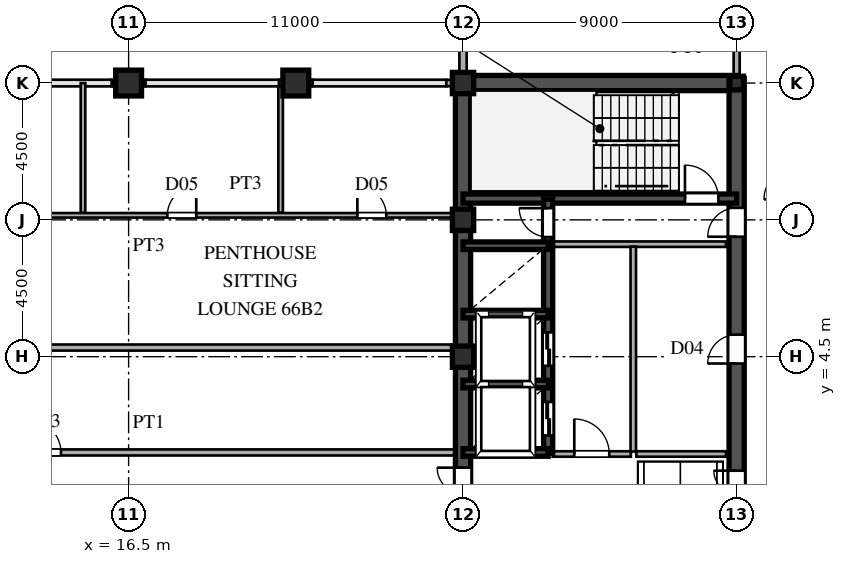
"""IFC4 building model, lengths in metres.
Left out: names, types, materials, properties, quantities, classifications, styles, units other than length and angle.
Written with IfcOpenShell. Run it as: python <this file> out.ifc"""

import sys

from ifc_helpers import new_model, si_unit, direction, frame, frame_2d, origin, origin_2d, place, context, subcontext, project, spatial, rectangle, hollow_rectangle, i_section, extrude, source, transform, mapped, element, fill, save


model = new_model("IFC4")
c1 = context("Model", 3, precision=1e-05, world=origin(), true_north=direction((0.0, 1.0)))
c2 = subcontext(c1, "Body", "Model", "MODEL_VIEW")
j1 = project(units=[si_unit("LENGTHUNIT", "METRE"), si_unit("PLANEANGLEUNIT", "RADIAN")], contexts=[c1])
p1 = place(None, origin())
s1 = spatial("IfcSite", under=j1, at=p1, CompositionType="ELEMENT")
p2 = place(p1, origin())
s2 = spatial("IfcBuilding", under=s1, at=p2, CompositionType="ELEMENT")
p3 = place(p2, frame((0.0, 0.0, 250.65)))
s3 = spatial("IfcBuildingStorey", under=s2, at=p3, CompositionType="ELEMENT", Elevation=250.65)
m1 = source(origin(), c2, "Body", "SweptSolid", [
    extrude(hollow_rectangle(XDim=0.7, YDim=0.7, WallThickness=0.03, at=origin_2d()), origin(), (0.0, 0.0, 1.0), 3.75),
])
for number, where, z_axis, x_axis in (
    (1, (27.5, 4.5, 0.0), (0.0, 0.0, 1.0), (1.0, 0.0, 0.0)),
    (2, (27.5, 9.0, 0.0), (0.0, 0.0, 1.0), (1.0, 0.0, 0.0)),
    (3, (27.5, 13.5, 0.0), (0.0, 0.0, 1.0), (1.0, 0.0, 0.0)),
):
    element("IfcColumn", number, at=place(p3, frame(where, z_axis=z_axis, x_axis=x_axis)), inside=s3, PredefinedType="COLUMN", context=c2, shape_type="MappedRepresentation", body=[
        mapped(m1, transform((0.0, 0.0, 0.0), scale=1.0)),
    ])
m2 = source(origin(), c2, "Body", "SweptSolid", [
    extrude(i_section(OverallWidth=0.45, OverallDepth=0.45, WebThickness=0.016, FlangeThickness=0.025, at=origin_2d()), origin(), (0.0, 0.0, 1.0), 3.75),
])
p4 = place(p3, frame((36.5, 13.5, 0.0), z_axis=(0.0, 0.0, 1.0), x_axis=(1.0, 0.0, 0.0)))
e4 = element("IfcColumn", 4, at=p4, inside=s3, PredefinedType="COLUMN", context=c2, shape_type="MappedRepresentation", body=[
    mapped(m2, transform((0.0, 0.0, 0.0), scale=1.0)),
])
m3 = source(origin(), c2, "Body", "SweptSolid", [
    extrude(hollow_rectangle(XDim=0.85, YDim=0.85, WallThickness=0.036, at=origin_2d()), origin(), (0.0, 0.0, 1.0), 3.75),
])
for number, where, z_axis, x_axis in (
    (5, (16.5, 13.5, 0.0), (0.0, 0.0, 1.0), (1.0, 0.0, 0.0)),
    (6, (22.0, 13.5, 0.0), (0.0, 0.0, 1.0), (1.0, 0.0, 0.0)),
):
    element("IfcColumn", number, at=place(p3, frame(where, z_axis=z_axis, x_axis=x_axis)), inside=s3, PredefinedType="COLUMN", context=c2, shape_type="MappedRepresentation", body=[
        mapped(m3, transform((0.0, 0.0, 0.0), scale=1.0)),
    ])
p5 = place(p3, frame((27.5, 13.755, 0.0), z_axis=(0.0, 0.0, 1.0), x_axis=(0.0, 1.0, 0.0)))
e7 = element("IfcWall", 7, at=p5, inside=s3, PredefinedType="SOLIDWALL", context=c2, shape_type="SweptSolid", body=[
    extrude(rectangle(XDim=0.62, YDim=0.24, at=frame_2d((0.31, 0.0))), origin(), (0.0, 0.0, 1.0), 3.03),
])
p6 = place(p3, frame((27.5, 14.375, 0.0), z_axis=(0.0, 0.0, 1.0), x_axis=(0.0, 1.0, 0.0)))
e8 = element("IfcWall", 8, at=p6, inside=s3, PredefinedType="SOLIDWALL", context=c2, shape_type="SweptSolid", body=[
    extrude(rectangle(XDim=1.605, YDim=0.24, at=frame_2d((0.803, 0.0))), origin(), (0.0, 0.0, 1.0), 3.53),
])
for number, where, z_axis, x_axis in (
    (9, (15.95, 13.5, 0.0), (0.0, 0.0, 1.0), (1.0, 0.0, 0.0)),
    (10, (21.45, 13.5, 0.0), (0.0, 0.0, 1.0), (1.0, 0.0, 0.0)),
):
    element("IfcWall", number, at=place(p3, frame(where, z_axis=z_axis, x_axis=x_axis)), inside=s3, PredefinedType="SOLIDWALL", context=c2, shape_type="SweptSolid", body=[
        extrude(rectangle(XDim=1.1, YDim=0.21, at=frame_2d((0.55, 0.0))), origin(), (0.0, 0.0, 1.0), 3.03),
    ])
p7 = place(p3, frame((26.95, 13.5, 0.0), z_axis=(0.0, 0.0, 1.0), x_axis=(1.0, 0.0, 0.0)))
e11 = element("IfcWall", 11, at=p7, inside=s3, PredefinedType="SOLIDWALL", context=c2, shape_type="SweptSolid", body=[
    extrude(rectangle(XDim=0.54, YDim=0.21, at=frame_2d((0.27, 0.0))), origin(), (0.0, 0.0, 1.0), 3.03),
])
p8 = place(p3, frame((27.5, 1.3, 0.0), z_axis=(0.0, 0.0, 1.0), x_axis=(0.0, 1.0, 0.0)))
e12 = element("IfcWall", 12, at=p8, inside=s3, PredefinedType="SHEAR", context=c2, shape_type="SweptSolid", body=[
    extrude(rectangle(XDim=12.2, YDim=0.5, at=frame_2d((6.1, 0.0))), origin(), (0.0, 0.0, 1.0), 3.53),
])
p9 = place(p3, frame((27.5, -1.3, 0.0), z_axis=(0.0, 0.0, 1.0), x_axis=(0.0, 1.0, 0.0)))
e13 = element("IfcWall", 13, at=p9, inside=s3, PredefinedType="SHEAR", context=c2, shape_type="SweptSolid", body=[
    extrude(rectangle(XDim=2.6, YDim=0.5, at=frame_2d((1.3, 0.0))), origin(), (0.0, 0.0, 1.0), 3.53),
])
p10 = place(p9, frame((0.45, 0.0, 0.0)))
e14 = element("IfcOpeningElement", 14, at=p10, cuts=e13, PredefinedType="OPENING", context=c2, shape_type="SweptSolid", body=[
    extrude(rectangle(XDim=1.7, YDim=2.35, at=frame_2d((0.85, 1.175))), frame((0.0, 0.26, 0.0), z_axis=(0.0, -1.0, 0.0), x_axis=(1.0, 0.0, 0.0)), (0.0, 0.0, 1.0), 0.52),
])
p11 = place(p3, frame((27.5, 13.5, 0.0), z_axis=(0.0, 0.0, 1.0), x_axis=(1.0, 0.0, 0.0)))
e15 = element("IfcWall", 15, at=p11, inside=s3, PredefinedType="SHEAR", context=c2, shape_type="SweptSolid", body=[
    extrude(rectangle(XDim=9.0, YDim=0.5, at=frame_2d((4.5, 0.0))), origin(), (0.0, 0.0, 1.0), 3.53),
])
p12 = place(p3, frame((36.5, -1.3, 0.0), z_axis=(0.0, 0.0, 1.0), x_axis=(0.0, 1.0, 0.0)))
e16 = element("IfcWall", 16, at=p12, inside=s3, PredefinedType="SHEAR", context=c2, shape_type="SweptSolid", body=[
    extrude(rectangle(XDim=2.6, YDim=0.5, at=frame_2d((1.3, 0.0))), origin(), (0.0, 0.0, 1.0), 3.53),
])
p13 = place(p12, frame((0.55, 0.0, 0.0)))
e17 = element("IfcOpeningElement", 17, at=p13, cuts=e16, PredefinedType="OPENING", context=c2, shape_type="SweptSolid", body=[
    extrude(rectangle(XDim=1.5, YDim=2.3, at=frame_2d((0.75, 1.15))), frame((0.0, 0.26, 0.0), z_axis=(0.0, -1.0, 0.0), x_axis=(1.0, 0.0, 0.0)), (0.0, 0.0, 1.0), 0.52),
])
p14 = place(p3, frame((36.5, 8.2, 0.0), z_axis=(0.0, 0.0, 1.0), x_axis=(0.0, 1.0, 0.0)))
e18 = element("IfcWall", 18, at=p14, inside=s3, PredefinedType="SHEAR", context=c2, shape_type="SweptSolid", body=[
    extrude(rectangle(XDim=5.45, YDim=0.5, at=frame_2d((2.725, 0.0))), origin(), (0.0, 0.0, 1.0), 3.53),
])
p15 = place(p14, frame((0.245, 0.0, 0.0)))
e19 = element("IfcOpeningElement", 19, at=p15, cuts=e18, PredefinedType="OPENING", context=c2, shape_type="SweptSolid", body=[
    extrude(rectangle(XDim=0.95, YDim=2.15, at=frame_2d((0.475, 1.075))), frame((0.0, 0.26, 0.0), z_axis=(0.0, -1.0, 0.0), x_axis=(1.0, 0.0, 0.0)), (0.0, 0.0, 1.0), 0.52),
])
p16 = place(p3, frame((36.5, 1.3, 0.0), z_axis=(0.0, 0.0, 1.0), x_axis=(0.0, 1.0, 0.0)))
e20 = element("IfcWall", 20, at=p16, inside=s3, PredefinedType="SHEAR", context=c2, shape_type="SweptSolid", body=[
    extrude(rectangle(XDim=6.9, YDim=0.5, at=frame_2d((3.45, 0.0))), origin(), (0.0, 0.0, 1.0), 3.53),
])
p17 = place(p16, frame((2.975, 0.0, 0.0)))
e21 = element("IfcOpeningElement", 21, at=p17, cuts=e20, PredefinedType="OPENING", context=c2, shape_type="SweptSolid", body=[
    extrude(rectangle(XDim=0.95, YDim=2.15, at=frame_2d((0.475, 1.075))), frame((0.0, 0.26, 0.0), z_axis=(0.0, -1.0, 0.0), x_axis=(1.0, 0.0, 0.0)), (0.0, 0.0, 1.0), 0.52),
])
p18 = place(p3, frame((27.5, 9.7, 0.0), z_axis=(0.0, 0.0, 1.0), x_axis=(1.0, 0.0, 0.0)))
e22 = element("IfcWall", 22, at=p18, inside=s3, PredefinedType="SHEAR", context=c2, shape_type="SweptSolid", body=[
    extrude(rectangle(XDim=9.0, YDim=0.3, at=frame_2d((4.5, 0.0))), origin(), (0.0, 0.0, 1.0), 3.53),
])
p19 = place(p18, frame((7.3, 0.0, 0.0)))
e23 = element("IfcOpeningElement", 23, at=p19, cuts=e22, PredefinedType="OPENING", context=c2, shape_type="SweptSolid", body=[
    extrude(rectangle(XDim=1.1, YDim=2.2, at=frame_2d((0.55, 1.1))), frame((0.0, 0.16, 0.0), z_axis=(0.0, -1.0, 0.0), x_axis=(1.0, 0.0, 0.0)), (0.0, 0.0, 1.0), 0.32),
])
for number, where, z_axis, x_axis in (
    (24, (27.5, 1.35, 0.0), (0.0, 0.0, 1.0), (1.0, 0.0, 0.0)),
    (25, (27.5, 3.6, 0.0), (0.0, 0.0, 1.0), (1.0, 0.0, 0.0)),
    (26, (27.5, 5.9, 0.0), (0.0, 0.0, 1.0), (1.0, 0.0, 0.0)),
    (27, (27.5, 8.15, 0.0), (0.0, 0.0, 1.0), (1.0, 0.0, 0.0)),
):
    element("IfcWall", number, at=place(p3, frame(where, z_axis=z_axis, x_axis=x_axis)), inside=s3, PredefinedType="SHEAR", context=c2, shape_type="SweptSolid", body=[
        extrude(rectangle(XDim=2.8, YDim=0.25, at=frame_2d((1.4, 0.0))), origin(), (0.0, 0.0, 1.0), 3.53),
    ])
p20 = place(p3, frame((30.3, 1.32, 0.0), z_axis=(0.0, 0.0, 1.0), x_axis=(0.0, 1.0, 0.0)))
e28 = element("IfcWall", 28, at=p20, inside=s3, PredefinedType="SHEAR", context=c2, shape_type="SweptSolid", body=[
    extrude(rectangle(XDim=2.28, YDim=0.3, at=frame_2d((1.14, 0.0))), origin(), (0.0, 0.0, 1.0), 3.53),
])
p21 = place(p20, frame((0.59, 0.0, 0.0)))
e29 = element("IfcOpeningElement", 29, at=p21, cuts=e28, PredefinedType="OPENING", context=c2, shape_type="SweptSolid", body=[
    extrude(rectangle(XDim=1.1, YDim=2.2, at=frame_2d((0.55, 1.1))), frame((0.0, 0.16, 0.0), z_axis=(0.0, -1.0, 0.0), x_axis=(1.0, 0.0, 0.0)), (0.0, 0.0, 1.0), 0.32),
])
p22 = place(p3, frame((30.3, 3.6, 0.0), z_axis=(0.0, 0.0, 1.0), x_axis=(0.0, 1.0, 0.0)))
e30 = element("IfcWall", 30, at=p22, inside=s3, PredefinedType="SHEAR", context=c2, shape_type="SweptSolid", body=[
    extrude(rectangle(XDim=2.3, YDim=0.3, at=frame_2d((1.15, 0.0))), origin(), (0.0, 0.0, 1.0), 3.53),
])
p23 = place(p22, frame((0.6, 0.0, 0.0)))
e31 = element("IfcOpeningElement", 31, at=p23, cuts=e30, PredefinedType="OPENING", context=c2, shape_type="SweptSolid", body=[
    extrude(rectangle(XDim=1.1, YDim=2.2, at=frame_2d((0.55, 1.1))), frame((0.0, 0.16, 0.0), z_axis=(0.0, -1.0, 0.0), x_axis=(1.0, 0.0, 0.0)), (0.0, 0.0, 1.0), 0.32),
])
p24 = place(p3, frame((30.3, 5.9, 0.0), z_axis=(0.0, 0.0, 1.0), x_axis=(0.0, 1.0, 0.0)))
e32 = element("IfcWall", 32, at=p24, inside=s3, PredefinedType="SHEAR", context=c2, shape_type="SweptSolid", body=[
    extrude(rectangle(XDim=2.25, YDim=0.3, at=frame_2d((1.125, 0.0))), origin(), (0.0, 0.0, 1.0), 3.53),
])
p25 = place(p3, frame((30.3, 8.15, 0.0), z_axis=(0.0, 0.0, 1.0), x_axis=(0.0, 1.0, 0.0)))
e33 = element("IfcWall", 33, at=p25, inside=s3, PredefinedType="SHEAR", context=c2, shape_type="SweptSolid", body=[
    extrude(rectangle(XDim=1.53, YDim=0.3, at=frame_2d((0.765, 0.0))), origin(), (0.0, 0.0, 1.0), 3.53),
])
p26 = place(p25, frame((0.285, 0.0, 0.0)))
e34 = element("IfcOpeningElement", 34, at=p26, cuts=e33, PredefinedType="OPENING", context=c2, shape_type="SweptSolid", body=[
    extrude(rectangle(XDim=0.95, YDim=2.15, at=frame_2d((0.475, 1.075))), frame((0.0, 0.16, 0.0), z_axis=(0.0, -1.0, 0.0), x_axis=(1.0, 0.0, 0.0)), (0.0, 0.0, 1.0), 0.32),
])
p27 = place(p3, frame((30.45, 8.2, 0.0), z_axis=(0.0, 0.0, 1.0), x_axis=(1.0, 0.0, 0.0)))
e35 = element("IfcWall", 35, at=p27, inside=s3, PredefinedType="PARTITIONING", context=c2, shape_type="SweptSolid", body=[
    extrude(rectangle(XDim=5.7, YDim=0.18, at=frame_2d((2.85, 0.0))), origin(), (0.0, 0.0, 1.0), 3.53),
])
p28 = place(p3, frame((33.1, 1.38, 0.0), z_axis=(0.0, 0.0, 1.0), x_axis=(0.0, 1.0, 0.0)))
e36 = element("IfcWall", 36, at=p28, inside=s3, PredefinedType="PARTITIONING", context=c2, shape_type="SweptSolid", body=[
    extrude(rectangle(XDim=6.74, YDim=0.18, at=frame_2d((3.37, 0.0))), origin(), (0.0, 0.0, 1.0), 3.53),
])
p29 = place(p3, frame((30.45, 1.3, 0.0), z_axis=(0.0, 0.0, 1.0), x_axis=(1.0, 0.0, 0.0)))
e37 = element("IfcWall", 37, at=p29, inside=s3, PredefinedType="PARTITIONING", context=c2, shape_type="SweptSolid", body=[
    extrude(rectangle(XDim=2.57, YDim=0.18, at=frame_2d((1.285, 0.0))), origin(), (0.0, 0.0, 1.0), 3.53),
])
p30 = place(p29, frame((0.71, 0.0, 0.0)))
e38 = element("IfcOpeningElement", 38, at=p30, cuts=e37, PredefinedType="OPENING", context=c2, shape_type="SweptSolid", body=[
    extrude(rectangle(XDim=1.15, YDim=2.2, at=frame_2d((0.575, 1.1))), frame((0.0, 0.1, 0.0), z_axis=(0.0, -1.0, 0.0), x_axis=(1.0, 0.0, 0.0)), (0.0, 0.0, 1.0), 0.2),
])
p31 = place(p3, frame((33.2, 1.3, 0.0), z_axis=(0.0, 0.0, 1.0), x_axis=(1.0, 0.0, 0.0)))
e39 = element("IfcWall", 39, at=p31, inside=s3, PredefinedType="PARTITIONING", context=c2, shape_type="SweptSolid", body=[
    extrude(rectangle(XDim=2.95, YDim=0.18, at=frame_2d((1.475, 0.0))), origin(), (0.0, 0.0, 1.0), 3.53),
])
p32 = place(p3, frame((7.085, 1.35, 0.0), z_axis=(0.0, 0.0, 1.0), x_axis=(1.0, 0.0, 0.0)))
e40 = element("IfcWall", 40, at=p32, inside=s3, PredefinedType="PARTITIONING", context=c2, shape_type="SweptSolid", body=[
    extrude(rectangle(XDim=20.16, YDim=0.2, at=frame_2d((10.08, 0.0))), origin(), (0.0, 0.0, 1.0), 3.53),
])
p33 = place(p32, frame((6.14, 0.0, 0.0)))
e41 = element("IfcOpeningElement", 41, at=p33, cuts=e40, PredefinedType="OPENING", context=c2, shape_type="SweptSolid", body=[
    extrude(rectangle(XDim=1.05, YDim=2.25, at=frame_2d((0.525, 1.125))), frame((0.0, 0.11, 0.0), z_axis=(0.0, -1.0, 0.0), x_axis=(1.0, 0.0, 0.0)), (0.0, 0.0, 1.0), 0.22),
])
p34 = place(p3, frame((-27.245, 4.8, 0.0), z_axis=(0.0, 0.0, 1.0), x_axis=(1.0, 0.0, 0.0)))
e42 = element("IfcWall", 42, at=p34, inside=s3, PredefinedType="PARTITIONING", context=c2, shape_type="SweptSolid", body=[
    extrude(rectangle(XDim=54.49, YDim=0.2, at=frame_2d((27.245, 0.0))), origin(), (0.0, 0.0, 1.0), 3.53),
])
p35 = place(p34, frame((24.97, 0.0, 0.0)))
e43 = element("IfcOpeningElement", 43, at=p35, cuts=e42, PredefinedType="OPENING", context=c2, shape_type="SweptSolid", body=[
    extrude(rectangle(XDim=1.05, YDim=2.25, at=frame_2d((0.525, 1.125))), frame((0.0, 0.11, 0.0), z_axis=(0.0, -1.0, 0.0), x_axis=(1.0, 0.0, 0.0)), (0.0, 0.0, 1.0), 0.22),
])
p36 = place(p3, frame((7.085, 9.15, 0.0), z_axis=(0.0, 0.0, 1.0), x_axis=(1.0, 0.0, 0.0)))
e44 = element("IfcWall", 44, at=p36, inside=s3, PredefinedType="PARTITIONING", context=c2, shape_type="SweptSolid", body=[
    extrude(rectangle(XDim=20.16, YDim=0.15, at=frame_2d((10.08, 0.0))), origin(), (0.0, 0.0, 1.0), 3.53),
])
p37 = place(p36, frame((3.44, 0.0, 0.0)))
e45 = element("IfcOpeningElement", 45, at=p37, cuts=e44, PredefinedType="OPENING", context=c2, shape_type="SweptSolid", body=[
    extrude(rectangle(XDim=0.95, YDim=2.15, at=frame_2d((0.475, 1.075))), frame((0.0, 0.085, 0.0), z_axis=(0.0, -1.0, 0.0), x_axis=(1.0, 0.0, 0.0)), (0.0, 0.0, 1.0), 0.17),
])
p38 = place(p36, frame((10.69, 0.0, 0.0)))
e46 = element("IfcOpeningElement", 46, at=p38, cuts=e44, PredefinedType="OPENING", context=c2, shape_type="SweptSolid", body=[
    extrude(rectangle(XDim=0.95, YDim=2.15, at=frame_2d((0.475, 1.075))), frame((0.0, 0.085, 0.0), z_axis=(0.0, -1.0, 0.0), x_axis=(1.0, 0.0, 0.0)), (0.0, 0.0, 1.0), 0.17),
])
p39 = place(p36, frame((16.94, 0.0, 0.0)))
e47 = element("IfcOpeningElement", 47, at=p39, cuts=e44, PredefinedType="OPENING", context=c2, shape_type="SweptSolid", body=[
    extrude(rectangle(XDim=0.95, YDim=2.15, at=frame_2d((0.475, 1.075))), frame((0.0, 0.085, 0.0), z_axis=(0.0, -1.0, 0.0), x_axis=(1.0, 0.0, 0.0)), (0.0, 0.0, 1.0), 0.17),
])
p40 = place(p3, frame((15.0, 9.235, 0.0), z_axis=(0.0, 0.0, 1.0), x_axis=(0.0, 1.0, 0.0)))
e48 = element("IfcWall", 48, at=p40, inside=s3, PredefinedType="PARTITIONING", context=c2, shape_type="SweptSolid", body=[
    extrude(rectangle(XDim=4.265, YDim=0.15, at=frame_2d((2.132, 0.0))), origin(), (0.0, 0.0, 1.0), 3.53),
])
p41 = place(p3, frame((21.5, 9.235, 0.0), z_axis=(0.0, 0.0, 1.0), x_axis=(0.0, 1.0, 0.0)))
e49 = element("IfcWall", 49, at=p41, inside=s3, PredefinedType="PARTITIONING", context=c2, shape_type="SweptSolid", body=[
    extrude(rectangle(XDim=4.155, YDim=0.15, at=frame_2d((2.077, 0.0))), origin(), (0.0, 0.0, 1.0), 3.53),
])
p42 = place(p3, frame((36.5, 13.755, 0.0), z_axis=(0.0, 0.0, 1.0), x_axis=(0.0, 1.0, 0.0)))
e50 = element("IfcWall", 50, at=p42, inside=s3, PredefinedType="PARTITIONING", context=c2, shape_type="SweptSolid", body=[
    extrude(rectangle(XDim=1.76, YDim=0.2, at=frame_2d((0.88, 0.0))), origin(), (0.0, 0.0, 1.0), 2.93),
])
m4 = source(origin(), c2, "Body", "SweptSolid", [
    extrude(rectangle(XDim=1.7, YDim=2.35, at=frame_2d((0.85, 1.175))), frame((0.0, 0.025, 0.0), z_axis=(0.0, -1.0, 0.0), x_axis=(1.0, 0.0, 0.0)), (0.0, 0.0, 1.0), 0.05),
])
p43 = place(p10, origin())
e51 = element("IfcDoor", 51, at=p43, inside=s3, OperationType="DOUBLE_SWING_LEFT", PredefinedType="DOOR", context=c2, shape_type="MappedRepresentation", body=[
    mapped(m4, transform((0.0, 0.0, 0.0), scale=1.0)),
])
fill(e14, e51)
m5 = source(origin(), c2, "Body", "SweptSolid", [
    extrude(rectangle(XDim=1.5, YDim=2.3, at=frame_2d((0.75, 1.15))), frame((0.0, 0.025, 0.0), z_axis=(0.0, -1.0, 0.0), x_axis=(1.0, 0.0, 0.0)), (0.0, 0.0, 1.0), 0.05),
])
p44 = place(p13, origin())
e52 = element("IfcDoor", 52, at=p44, inside=s3, OperationType="DOUBLE_SWING_LEFT", PredefinedType="DOOR", context=c2, shape_type="MappedRepresentation", body=[
    mapped(m5, transform((0.0, 0.0, 0.0), scale=1.0)),
])
fill(e17, e52)
m6 = source(origin(), c2, "Body", "SweptSolid", [
    extrude(rectangle(XDim=0.95, YDim=2.15, at=frame_2d((0.475, 1.075))), frame((0.0, 0.025, 0.0), z_axis=(0.0, -1.0, 0.0), x_axis=(1.0, 0.0, 0.0)), (0.0, 0.0, 1.0), 0.05),
])
p45 = place(p15, origin())
e53 = element("IfcDoor", 53, at=p45, inside=s3, OperationType="SINGLE_SWING_LEFT", PredefinedType="DOOR", context=c2, shape_type="MappedRepresentation", body=[
    mapped(m6, transform((0.0, 0.0, 0.0), scale=1.0)),
])
fill(e19, e53)
p46 = place(p17, origin())
e54 = element("IfcDoor", 54, at=p46, inside=s3, OperationType="SINGLE_SWING_LEFT", PredefinedType="DOOR", context=c2, shape_type="MappedRepresentation", body=[
    mapped(m6, transform((0.0, 0.0, 0.0), scale=1.0)),
])
fill(e21, e54)
m7 = source(origin(), c2, "Body", "SweptSolid", [
    extrude(rectangle(XDim=1.1, YDim=2.2, at=frame_2d((0.55, 1.1))), frame((0.0, 0.025, 0.0), z_axis=(0.0, -1.0, 0.0), x_axis=(1.0, 0.0, 0.0)), (0.0, 0.0, 1.0), 0.05),
])
p47 = place(p19, origin())
e55 = element("IfcDoor", 55, at=p47, inside=s3, OperationType="SINGLE_SWING_LEFT", PredefinedType="DOOR", context=c2, shape_type="MappedRepresentation", body=[
    mapped(m7, transform((0.0, 0.0, 0.0), scale=1.0)),
])
fill(e23, e55)
m8 = source(origin(), c2, "Body", "SweptSolid", [
    extrude(rectangle(XDim=1.1, YDim=2.2, at=frame_2d((0.55, 1.1))), frame((0.0, 0.025, 0.0), z_axis=(0.0, -1.0, 0.0), x_axis=(1.0, 0.0, 0.0)), (0.0, 0.0, 1.0), 0.05),
])
p48 = place(p21, origin())
e56 = element("IfcDoor", 56, at=p48, inside=s3, OperationType="DOUBLE_DOOR_SLIDING", PredefinedType="DOOR", context=c2, shape_type="MappedRepresentation", body=[
    mapped(m8, transform((0.0, 0.0, 0.0), scale=1.0)),
])
fill(e29, e56)
p49 = place(p23, origin())
e57 = element("IfcDoor", 57, at=p49, inside=s3, OperationType="DOUBLE_DOOR_SLIDING", PredefinedType="DOOR", context=c2, shape_type="MappedRepresentation", body=[
    mapped(m8, transform((0.0, 0.0, 0.0), scale=1.0)),
])
fill(e31, e57)
p50 = place(p26, origin())
e58 = element("IfcDoor", 58, at=p50, inside=s3, OperationType="SINGLE_SWING_RIGHT", PredefinedType="DOOR", context=c2, shape_type="MappedRepresentation", body=[
    mapped(m6, transform((0.0, 0.0, 0.0), scale=1.0)),
])
fill(e34, e58)
m9 = source(origin(), c2, "Body", "SweptSolid", [
    extrude(rectangle(XDim=1.15, YDim=2.2, at=frame_2d((0.575, 1.1))), frame((0.0, 0.025, 0.0), z_axis=(0.0, -1.0, 0.0), x_axis=(1.0, 0.0, 0.0)), (0.0, 0.0, 1.0), 0.05),
])
p51 = place(p30, origin())
e59 = element("IfcDoor", 59, at=p51, inside=s3, OperationType="SINGLE_SWING_LEFT", PredefinedType="DOOR", context=c2, shape_type="MappedRepresentation", body=[
    mapped(m9, transform((0.0, 0.0, 0.0), scale=1.0)),
])
fill(e38, e59)
m10 = source(origin(), c2, "Body", "SweptSolid", [
    extrude(rectangle(XDim=1.05, YDim=2.25, at=frame_2d((0.525, 1.125))), frame((0.0, 0.025, 0.0), z_axis=(0.0, -1.0, 0.0), x_axis=(1.0, 0.0, 0.0)), (0.0, 0.0, 1.0), 0.05),
])
p52 = place(p33, origin())
e60 = element("IfcDoor", 60, at=p52, inside=s3, OperationType="SINGLE_SWING_LEFT", PredefinedType="DOOR", context=c2, shape_type="MappedRepresentation", body=[
    mapped(m10, transform((0.0, 0.0, 0.0), scale=1.0)),
])
fill(e41, e60)
m11 = source(origin(), c2, "Body", "SweptSolid", [
    extrude(rectangle(XDim=0.95, YDim=2.15, at=frame_2d((0.475, 1.075))), frame((0.0, 0.025, 0.0), z_axis=(0.0, -1.0, 0.0), x_axis=(1.0, 0.0, 0.0)), (0.0, 0.0, 1.0), 0.05),
])
p53 = place(p38, origin())
e61 = element("IfcDoor", 61, at=p53, inside=s3, OperationType="SINGLE_SWING_RIGHT", PredefinedType="DOOR", context=c2, shape_type="MappedRepresentation", body=[
    mapped(m11, transform((0.0, 0.0, 0.0), scale=1.0)),
])
fill(e46, e61)
p54 = place(p39, origin())
e62 = element("IfcDoor", 62, at=p54, inside=s3, OperationType="SINGLE_SWING_LEFT", PredefinedType="DOOR", context=c2, shape_type="MappedRepresentation", body=[
    mapped(m11, transform((0.0, 0.0, 0.0), scale=1.0)),
])
fill(e47, e62)
save(model, sys.argv[1])
